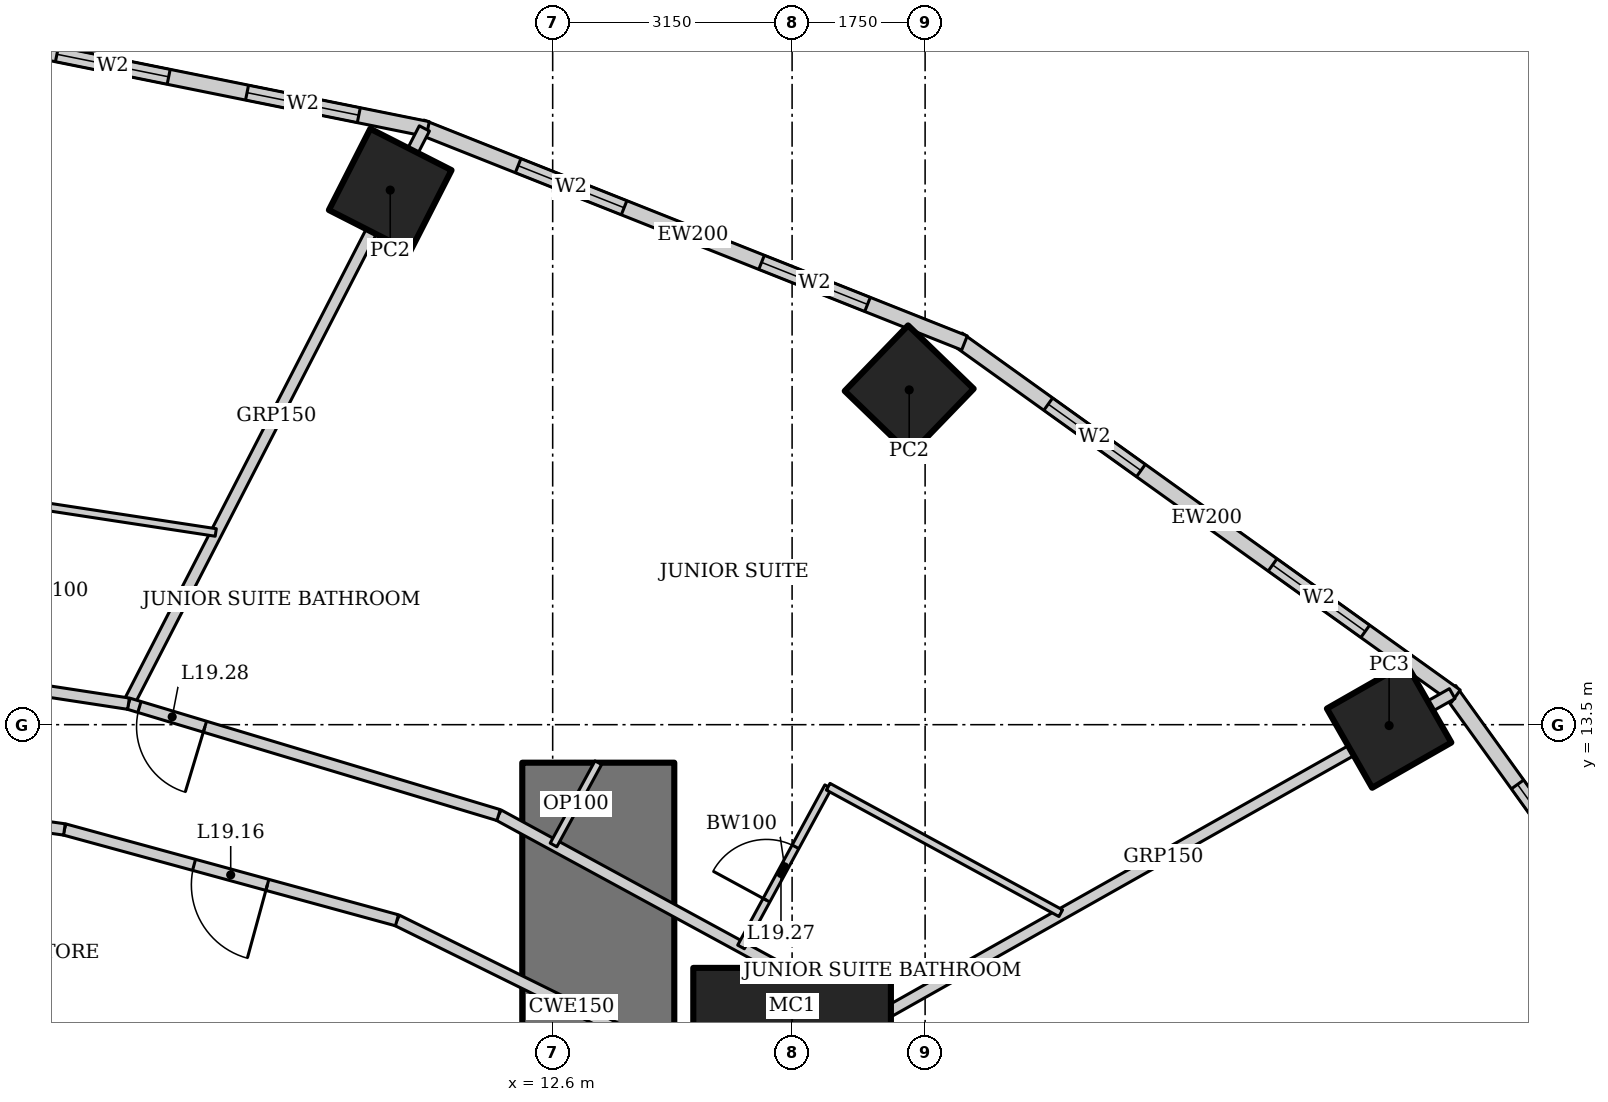
"""IFC4 building model, lengths in metres.
Left out: names, types, materials, properties, quantities, classifications, styles, units other than length and angle.
Written with IfcOpenShell. Run it as: python <this file> out.ifc"""

import sys

from ifc_helpers import new_model, si_unit, direction, frame, frame_2d, origin, origin_2d, place, context, subcontext, project, spatial, rectangle, hollow_rectangle, extrude, element, fill, save


model = new_model("IFC4")
c1 = context("Model", 3, precision=1e-05, world=origin(), true_north=direction((0.0, 1.0)))
c2 = subcontext(c1, "Body", "Model", "MODEL_VIEW")
j1 = project(units=[si_unit("LENGTHUNIT", "METRE"), si_unit("PLANEANGLEUNIT", "RADIAN")], contexts=[c1])
p1 = place(None, origin())
s1 = spatial("IfcSite", under=j1, at=p1, CompositionType="ELEMENT")
p2 = place(p1, origin())
s2 = spatial("IfcBuilding", under=s1, at=p2, CompositionType="ELEMENT")
p3 = place(p2, frame((0.0, 0.0, 83.8)))
s3 = spatial("IfcBuildingStorey", under=s2, at=p3, CompositionType="ELEMENT", Elevation=83.8)
p4 = place(p3, frame((15.75, 9.0, 0.0), z_axis=(0.0, 0.0, 1.0), x_axis=(1.0, 0.0, 0.0)))
e1 = element("IfcColumn", 1, at=p4, inside=s3, PredefinedType="COLUMN", context=c2, shape_type="SweptSolid", body=[
    extrude(hollow_rectangle(XDim=2.6, YDim=2.6, WallThickness=0.13, at=origin_2d()), origin(), (0.0, 0.0, 1.0), 3.6),
])
p5 = place(p3, frame((23.605, 13.489, 0.0), z_axis=(0.0, 0.0, 1.0), x_axis=(0.86824298017, 0.496139221777, 0.0)))
e2 = element("IfcColumn", 2, at=p5, inside=s3, PredefinedType="COLUMN", context=c2, shape_type="SweptSolid", body=[
    extrude(hollow_rectangle(XDim=1.2, YDim=1.2, WallThickness=0.12, at=origin_2d()), origin(), (0.0, 0.0, 1.0), 3.6),
])
for number, where, z_axis, x_axis in (
    (3, (17.291, 17.905, 0.0), (0.0, 0.0, 1.0), (0.695, 0.719, 0.0)),
    (4, (10.463, 20.534, 0.0), (0.0, 0.0, 1.0), (0.454, 0.891, 0.0)),
):
    element("IfcColumn", number, at=place(p3, frame(where, z_axis=z_axis, x_axis=x_axis)), inside=s3, PredefinedType="COLUMN", context=c2, shape_type="SweptSolid", body=[
        extrude(hollow_rectangle(XDim=1.2, YDim=1.2, WallThickness=0.1, at=origin_2d()), origin(), (0.0, 0.0, 1.0), 3.6),
    ])
p6 = place(p3, frame((13.2, -13.0, 0.0), z_axis=(0.0, 0.0, 1.0), x_axis=(0.0, 1.0, 0.0)))
e5 = element("IfcWall", 5, at=p6, inside=s3, PredefinedType="SHEAR", context=c2, shape_type="SweptSolid", body=[
    extrude(rectangle(XDim=26.0, YDim=2.0, at=frame_2d((13.0, 0.0))), origin(), (0.0, 0.0, 1.0), 3.6),
])
p7 = place(p6, frame((12.1, 0.0, 0.0)))
e6 = element("IfcOpeningElement", 6, at=p7, cuts=e5, PredefinedType="OPENING", context=c2, shape_type="SweptSolid", body=[
    extrude(rectangle(XDim=1.8, YDim=2.1, at=frame_2d((0.9, 1.05))), frame((0.0, 1.01, 0.0), z_axis=(0.0, -1.0, 0.0), x_axis=(1.0, 0.0, 0.0)), (0.0, 0.0, 1.0), 2.02),
])
p8 = place(p3, frame((29.26, 7.2, 0.0), z_axis=(0.0, 0.0, 1.0), x_axis=(-0.583937613703, 0.811798536155, 0.0)))
e7 = element("IfcWall", 7, at=p8, inside=s3, PredefinedType="SOLIDWALL", context=c2, shape_type="SweptSolid", body=[
    extrude(rectangle(XDim=8.323, YDim=0.2, at=frame_2d((4.162, 0.0))), origin(), (0.0, 0.0, 1.0), 3.45),
])
p9 = place(p8, frame((1.531, 0.0, 0.5)))
e8 = element("IfcOpeningElement", 8, at=p9, cuts=e7, PredefinedType="OPENING", context=c2, shape_type="SweptSolid", body=[
    extrude(rectangle(XDim=1.5, YDim=2.2, at=frame_2d((0.75, 1.1))), frame((0.0, 0.11, 0.0), z_axis=(0.0, -1.0, 0.0), x_axis=(1.0, 0.0, 0.0)), (0.0, 0.0, 1.0), 0.22),
])
p10 = place(p8, frame((5.292, 0.0, 0.5)))
e9 = element("IfcOpeningElement", 9, at=p10, cuts=e7, PredefinedType="OPENING", context=c2, shape_type="SweptSolid", body=[
    extrude(rectangle(XDim=1.5, YDim=2.2, at=frame_2d((0.75, 1.1))), frame((0.0, 0.11, 0.0), z_axis=(0.0, -1.0, 0.0), x_axis=(1.0, 0.0, 0.0)), (0.0, 0.0, 1.0), 0.22),
])
p11 = place(p3, frame((24.482, 13.875, 0.0), z_axis=(0.0, 0.0, 1.0), x_axis=(-0.812791321576, 0.582554948112, 0.0)))
e10 = element("IfcWall", 10, at=p11, inside=s3, PredefinedType="SOLIDWALL", context=c2, shape_type="SweptSolid", body=[
    extrude(rectangle(XDim=8.063, YDim=0.2, at=frame_2d((4.032, 0.0))), origin(), (0.0, 0.0, 1.0), 3.45),
])
p12 = place(p11, frame((1.466, 0.0, 0.5)))
e11 = element("IfcOpeningElement", 11, at=p12, cuts=e10, PredefinedType="OPENING", context=c2, shape_type="SweptSolid", body=[
    extrude(rectangle(XDim=1.5, YDim=2.2, at=frame_2d((0.75, 1.1))), frame((0.0, 0.11, 0.0), z_axis=(0.0, -1.0, 0.0), x_axis=(1.0, 0.0, 0.0)), (0.0, 0.0, 1.0), 0.22),
])
p13 = place(p11, frame((5.097, 0.0, 0.5)))
e12 = element("IfcOpeningElement", 12, at=p13, cuts=e10, PredefinedType="OPENING", context=c2, shape_type="SweptSolid", body=[
    extrude(rectangle(XDim=1.5, YDim=2.2, at=frame_2d((0.75, 1.1))), frame((0.0, 0.11, 0.0), z_axis=(0.0, -1.0, 0.0), x_axis=(1.0, 0.0, 0.0)), (0.0, 0.0, 1.0), 0.22),
])
p14 = place(p3, frame((18.018, 18.523, 0.0), z_axis=(0.0, 0.0, 1.0), x_axis=(-0.929358351251, 0.369178892895, 0.0)))
e13 = element("IfcWall", 13, at=p14, inside=s3, PredefinedType="SOLIDWALL", context=c2, shape_type="SweptSolid", body=[
    extrude(rectangle(XDim=7.692, YDim=0.2, at=frame_2d((3.846, 0.0))), origin(), (0.0, 0.0, 1.0), 3.45),
])
p15 = place(p14, frame((1.373, 0.0, 0.5)))
e14 = element("IfcOpeningElement", 14, at=p15, cuts=e13, PredefinedType="OPENING", context=c2, shape_type="SweptSolid", body=[
    extrude(rectangle(XDim=1.5, YDim=2.2, at=frame_2d((0.75, 1.1))), frame((0.0, 0.11, 0.0), z_axis=(0.0, -1.0, 0.0), x_axis=(1.0, 0.0, 0.0)), (0.0, 0.0, 1.0), 0.22),
])
p16 = place(p14, frame((4.819, 0.0, 0.5)))
e15 = element("IfcOpeningElement", 15, at=p16, cuts=e13, PredefinedType="OPENING", context=c2, shape_type="SweptSolid", body=[
    extrude(rectangle(XDim=1.5, YDim=2.2, at=frame_2d((0.75, 1.1))), frame((0.0, 0.11, 0.0), z_axis=(0.0, -1.0, 0.0), x_axis=(1.0, 0.0, 0.0)), (0.0, 0.0, 1.0), 0.22),
])
p17 = place(p3, frame((10.957, 21.337, 0.0), z_axis=(0.0, 0.0, 1.0), x_axis=(-0.980251657452, 0.197754110105, 0.0)))
e16 = element("IfcWall", 16, at=p17, inside=s3, PredefinedType="SOLIDWALL", context=c2, shape_type="SweptSolid", body=[
    extrude(rectangle(XDim=5.904, YDim=0.2, at=frame_2d((2.952, 0.0))), origin(), (0.0, 0.0, 1.0), 3.45),
])
p18 = place(p17, frame((0.926, 0.0, 0.5)))
e17 = element("IfcOpeningElement", 17, at=p18, cuts=e16, PredefinedType="OPENING", context=c2, shape_type="SweptSolid", body=[
    extrude(rectangle(XDim=1.5, YDim=2.2, at=frame_2d((0.75, 1.1))), frame((0.0, 0.11, 0.0), z_axis=(0.0, -1.0, 0.0), x_axis=(1.0, 0.0, 0.0)), (0.0, 0.0, 1.0), 0.22),
])
p19 = place(p17, frame((3.478, 0.0, 0.5)))
e18 = element("IfcOpeningElement", 18, at=p19, cuts=e16, PredefinedType="OPENING", context=c2, shape_type="SweptSolid", body=[
    extrude(rectangle(XDim=1.5, YDim=2.2, at=frame_2d((0.75, 1.1))), frame((0.0, 0.11, 0.0), z_axis=(0.0, -1.0, 0.0), x_axis=(1.0, 0.0, 0.0)), (0.0, 0.0, 1.0), 0.22),
])
p20 = place(p3, frame((24.435, 13.909, 0.0), z_axis=(0.0, 0.0, 1.0), x_axis=(-0.87090601027, -0.491449612143, 0.0)))
e19 = element("IfcWall", 19, at=p20, inside=s3, PredefinedType="PARTITIONING", context=c2, shape_type="SweptSolid", body=[
    extrude(rectangle(XDim=8.726, YDim=0.15, at=frame_2d((4.363, 0.0))), origin(), (0.0, 0.0, 1.0), 2.693),
])
p21 = place(p3, frame((10.912, 21.346, 0.0), z_axis=(0.0, 0.0, 1.0), x_axis=(-0.457327273085, -0.889298468059, 0.0)))
e20 = element("IfcWall", 20, at=p21, inside=s3, PredefinedType="PARTITIONING", context=c2, shape_type="SweptSolid", body=[
    extrude(rectangle(XDim=8.511, YDim=0.15, at=frame_2d((4.256, 0.0))), origin(), (0.0, 0.0, 1.0), 2.528),
])
p22 = place(p3, frame((20.984, 5.232, 0.0), z_axis=(0.0, 0.0, 1.0), x_axis=(-0.687062608696, 0.726598218916, 0.0)))
e21 = element("IfcWall", 21, at=p22, inside=s3, PredefinedType="PARTITIONING", context=c2, shape_type="SweptSolid", body=[
    extrude(rectangle(XDim=6.039, YDim=0.15, at=frame_2d((3.02, 0.0))), origin(), (0.0, 0.0, 1.0), 3.45),
])
p23 = place(p22, frame((0.15, 0.0, 0.0)))
e22 = element("IfcOpeningElement", 22, at=p23, cuts=e21, PredefinedType="OPENING", context=c2, shape_type="SweptSolid", body=[
    extrude(rectangle(XDim=0.9, YDim=2.1, at=frame_2d((0.45, 1.05))), frame((0.0, 0.085, 0.0), z_axis=(0.0, -1.0, 0.0), x_axis=(1.0, 0.0, 0.0)), (0.0, 0.0, 1.0), 0.17),
])
p24 = place(p3, frame((16.835, 9.62, 0.0), z_axis=(0.0, 0.0, 1.0), x_axis=(-0.878450059298, 0.477834169267, 0.0)))
e23 = element("IfcWall", 23, at=p24, inside=s3, PredefinedType="PARTITIONING", context=c2, shape_type="SweptSolid", body=[
    extrude(rectangle(XDim=5.631, YDim=0.15, at=frame_2d((2.815, 0.0))), origin(), (0.0, 0.0, 1.0), 3.45),
])
p25 = place(p3, frame((11.888, 12.311, 0.0), z_axis=(0.0, 0.0, 1.0), x_axis=(-0.957564241242, 0.288219922793, 0.0)))
e24 = element("IfcWall", 24, at=p25, inside=s3, PredefinedType="PARTITIONING", context=c2, shape_type="SweptSolid", body=[
    extrude(rectangle(XDim=5.085, YDim=0.15, at=frame_2d((2.542, 0.0))), origin(), (0.0, 0.0, 1.0), 3.45),
])
p26 = place(p25, frame((4.035, 0.0, 0.0)))
e25 = element("IfcOpeningElement", 25, at=p26, cuts=e24, PredefinedType="OPENING", context=c2, shape_type="SweptSolid", body=[
    extrude(rectangle(XDim=0.9, YDim=2.1, at=frame_2d((0.45, 1.05))), frame((0.0, 0.085, 0.0), z_axis=(0.0, -1.0, 0.0), x_axis=(1.0, 0.0, 0.0)), (0.0, 0.0, 1.0), 0.17),
])
p27 = place(p3, frame((7.019, 13.776, 0.0), z_axis=(0.0, 0.0, 1.0), x_axis=(-0.988564270062, 0.150800145746, 0.0)))
e26 = element("IfcWall", 26, at=p27, inside=s3, PredefinedType="PARTITIONING", context=c2, shape_type="SweptSolid", body=[
    extrude(rectangle(XDim=3.751, YDim=0.15, at=frame_2d((1.875, 0.0))), origin(), (0.0, 0.0, 1.0), 3.45),
])
p28 = place(p3, frame((15.147, 8.656, 0.0), z_axis=(0.0, 0.0, 1.0), x_axis=(-0.89656943448, 0.442903205177, 0.0)))
e27 = element("IfcWall", 27, at=p28, inside=s3, PredefinedType="PARTITIONING", context=c2, shape_type="SweptSolid", body=[
    extrude(rectangle(XDim=5.126, YDim=0.15, at=frame_2d((2.563, 0.0))), origin(), (0.0, 0.0, 1.0), 3.45),
])
p29 = place(p3, frame((10.551, 10.926, 0.0), z_axis=(0.0, 0.0, 1.0), x_axis=(-0.964644466646, 0.263554648923, 0.0)))
e28 = element("IfcWall", 28, at=p29, inside=s3, PredefinedType="PARTITIONING", context=c2, shape_type="SweptSolid", body=[
    extrude(rectangle(XDim=4.535, YDim=0.15, at=frame_2d((2.268, 0.0))), origin(), (0.0, 0.0, 1.0), 3.45),
])
p30 = place(p29, frame((1.768, 0.0, 0.0)))
e29 = element("IfcOpeningElement", 29, at=p30, cuts=e28, PredefinedType="OPENING", context=c2, shape_type="SweptSolid", body=[
    extrude(rectangle(XDim=1.0, YDim=2.1, at=frame_2d((0.5, 1.05))), frame((0.0, 0.085, 0.0), z_axis=(0.0, -1.0, 0.0), x_axis=(1.0, 0.0, 0.0)), (0.0, 0.0, 1.0), 0.17),
])
p31 = place(p3, frame((6.176, 12.122, 0.0), z_axis=(0.0, 0.0, 1.0), x_axis=(-0.990563451353, 0.137054911782, 0.0)))
e30 = element("IfcWall", 30, at=p31, inside=s3, PredefinedType="PARTITIONING", context=c2, shape_type="SweptSolid", body=[
    extrude(rectangle(XDim=3.304, YDim=0.15, at=frame_2d((1.652, 0.0))), origin(), (0.0, 0.0, 1.0), 3.45),
])
p32 = place(p3, frame((15.078, 10.576, 0.0), z_axis=(0.0, 0.0, 1.0), x_axis=(0.477832549678, 0.878450940274, 0.0)))
e31 = element("IfcWall", 31, at=p32, inside=s3, PredefinedType="PARTITIONING", context=c2, shape_type="SweptSolid", body=[
    extrude(rectangle(XDim=2.4, YDim=0.1, at=frame_2d((1.2, 0.0))), origin(), (0.0, 0.0, 1.0), 3.45),
])
p33 = place(p32, frame((0.7, 0.0, 0.0)))
e32 = element("IfcOpeningElement", 32, at=p33, cuts=e31, PredefinedType="OPENING", context=c2, shape_type="SweptSolid", body=[
    extrude(rectangle(XDim=0.8, YDim=2.1, at=frame_2d((0.4, 1.05))), frame((0.0, 0.06, 0.0), z_axis=(0.0, -1.0, 0.0), x_axis=(1.0, 0.0, 0.0)), (0.0, 0.0, 1.0), 0.12),
])
p34 = place(p3, frame((16.225, 12.684, 0.0), z_axis=(0.0, 0.0, 1.0), x_axis=(0.878473578893, -0.477790928322, 0.0)))
e33 = element("IfcWall", 33, at=p34, inside=s3, PredefinedType="PARTITIONING", context=c2, shape_type="SweptSolid", body=[
    extrude(rectangle(XDim=3.483, YDim=0.1, at=frame_2d((1.741, 0.0))), origin(), (0.0, 0.0, 1.0), 3.45),
])
p35 = place(p3, frame((5.404, 16.45, 0.0), z_axis=(0.0, 0.0, 1.0), x_axis=(0.988568792086, -0.150770498819, 0.0)))
e34 = element("IfcWall", 34, at=p35, inside=s3, PredefinedType="PARTITIONING", context=c2, shape_type="SweptSolid", body=[
    extrude(rectangle(XDim=2.795, YDim=0.1, at=frame_2d((1.397, 0.0))), origin(), (0.0, 0.0, 1.0), 3.45),
])
p36 = place(p3, frame((13.2, 13.0, 0.0), z_axis=(0.0, 0.0, 1.0), x_axis=(-0.477852414256, -0.878440134665, 0.0)))
e35 = element("IfcWall", 35, at=p36, inside=s3, PredefinedType="PARTITIONING", context=c2, shape_type="SweptSolid", body=[
    extrude(rectangle(XDim=1.232, YDim=0.1, at=frame_2d((0.616, 0.0))), origin(), (0.0, 0.0, 1.0), 3.45),
])
p37 = place(p10, origin())
e36 = element("IfcWindow", 36, at=p37, inside=s3, PartitioningType="SINGLE_PANEL", PredefinedType="WINDOW", context=c2, shape_type="SweptSolid", body=[
    extrude(rectangle(XDim=1.5, YDim=2.2, at=frame_2d((0.75, 1.1))), frame((0.0, 0.03, 0.0), z_axis=(0.0, -1.0, 0.0), x_axis=(1.0, 0.0, 0.0)), (0.0, 0.0, 1.0), 0.06),
])
fill(e9, e36)
p38 = place(p12, origin())
e37 = element("IfcWindow", 37, at=p38, inside=s3, PartitioningType="SINGLE_PANEL", PredefinedType="WINDOW", context=c2, shape_type="SweptSolid", body=[
    extrude(rectangle(XDim=1.5, YDim=2.2, at=frame_2d((0.75, 1.1))), frame((0.0, 0.03, 0.0), z_axis=(0.0, -1.0, 0.0), x_axis=(1.0, 0.0, 0.0)), (0.0, 0.0, 1.0), 0.06),
])
fill(e11, e37)
p39 = place(p13, origin())
e38 = element("IfcWindow", 38, at=p39, inside=s3, PartitioningType="SINGLE_PANEL", PredefinedType="WINDOW", context=c2, shape_type="SweptSolid", body=[
    extrude(rectangle(XDim=1.5, YDim=2.2, at=frame_2d((0.75, 1.1))), frame((0.0, 0.03, 0.0), z_axis=(0.0, -1.0, 0.0), x_axis=(1.0, 0.0, 0.0)), (0.0, 0.0, 1.0), 0.06),
])
fill(e12, e38)
p40 = place(p15, origin())
e39 = element("IfcWindow", 39, at=p40, inside=s3, PartitioningType="SINGLE_PANEL", PredefinedType="WINDOW", context=c2, shape_type="SweptSolid", body=[
    extrude(rectangle(XDim=1.5, YDim=2.2, at=frame_2d((0.75, 1.1))), frame((0.0, 0.03, 0.0), z_axis=(0.0, -1.0, 0.0), x_axis=(1.0, 0.0, 0.0)), (0.0, 0.0, 1.0), 0.06),
])
fill(e14, e39)
p41 = place(p16, origin())
e40 = element("IfcWindow", 40, at=p41, inside=s3, PartitioningType="SINGLE_PANEL", PredefinedType="WINDOW", context=c2, shape_type="SweptSolid", body=[
    extrude(rectangle(XDim=1.5, YDim=2.2, at=frame_2d((0.75, 1.1))), frame((0.0, 0.03, 0.0), z_axis=(0.0, -1.0, 0.0), x_axis=(1.0, 0.0, 0.0)), (0.0, 0.0, 1.0), 0.06),
])
fill(e15, e40)
p42 = place(p18, origin())
e41 = element("IfcWindow", 41, at=p42, inside=s3, PartitioningType="SINGLE_PANEL", PredefinedType="WINDOW", context=c2, shape_type="SweptSolid", body=[
    extrude(rectangle(XDim=1.5, YDim=2.2, at=frame_2d((0.75, 1.1))), frame((0.0, 0.03, 0.0), z_axis=(0.0, -1.0, 0.0), x_axis=(1.0, 0.0, 0.0)), (0.0, 0.0, 1.0), 0.06),
])
fill(e17, e41)
p43 = place(p19, origin())
e42 = element("IfcWindow", 42, at=p43, inside=s3, PartitioningType="SINGLE_PANEL", PredefinedType="WINDOW", context=c2, shape_type="SweptSolid", body=[
    extrude(rectangle(XDim=1.5, YDim=2.2, at=frame_2d((0.75, 1.1))), frame((0.0, 0.03, 0.0), z_axis=(0.0, -1.0, 0.0), x_axis=(1.0, 0.0, 0.0)), (0.0, 0.0, 1.0), 0.06),
])
fill(e18, e42)
p44 = place(p30, origin())
e43 = element("IfcDoor", 43, at=p44, inside=s3, OperationType="SINGLE_SWING_LEFT", PredefinedType="DOOR", context=c2, shape_type="SweptSolid", body=[
    extrude(rectangle(XDim=1.0, YDim=2.1, at=frame_2d((0.5, 1.05))), frame((0.0, 0.025, 0.0), z_axis=(0.0, -1.0, 0.0), x_axis=(1.0, 0.0, 0.0)), (0.0, 0.0, 1.0), 0.05),
])
fill(e29, e43)
p45 = place(p33, origin())
e44 = element("IfcDoor", 44, at=p45, inside=s3, OperationType="SINGLE_SWING_LEFT", PredefinedType="DOOR", context=c2, shape_type="SweptSolid", body=[
    extrude(rectangle(XDim=0.8, YDim=2.1, at=frame_2d((0.4, 1.05))), frame((0.0, 0.025, 0.0), z_axis=(0.0, -1.0, 0.0), x_axis=(1.0, 0.0, 0.0)), (0.0, 0.0, 1.0), 0.05),
])
fill(e32, e44)
p46 = place(p26, origin())
e45 = element("IfcDoor", 45, at=p46, inside=s3, OperationType="SINGLE_SWING_LEFT", PredefinedType="DOOR", context=c2, shape_type="SweptSolid", body=[
    extrude(rectangle(XDim=0.9, YDim=2.1, at=frame_2d((0.45, 1.05))), frame((0.0, 0.025, 0.0), z_axis=(0.0, -1.0, 0.0), x_axis=(1.0, 0.0, 0.0)), (0.0, 0.0, 1.0), 0.05),
])
fill(e25, e45)
save(model, sys.argv[1])
